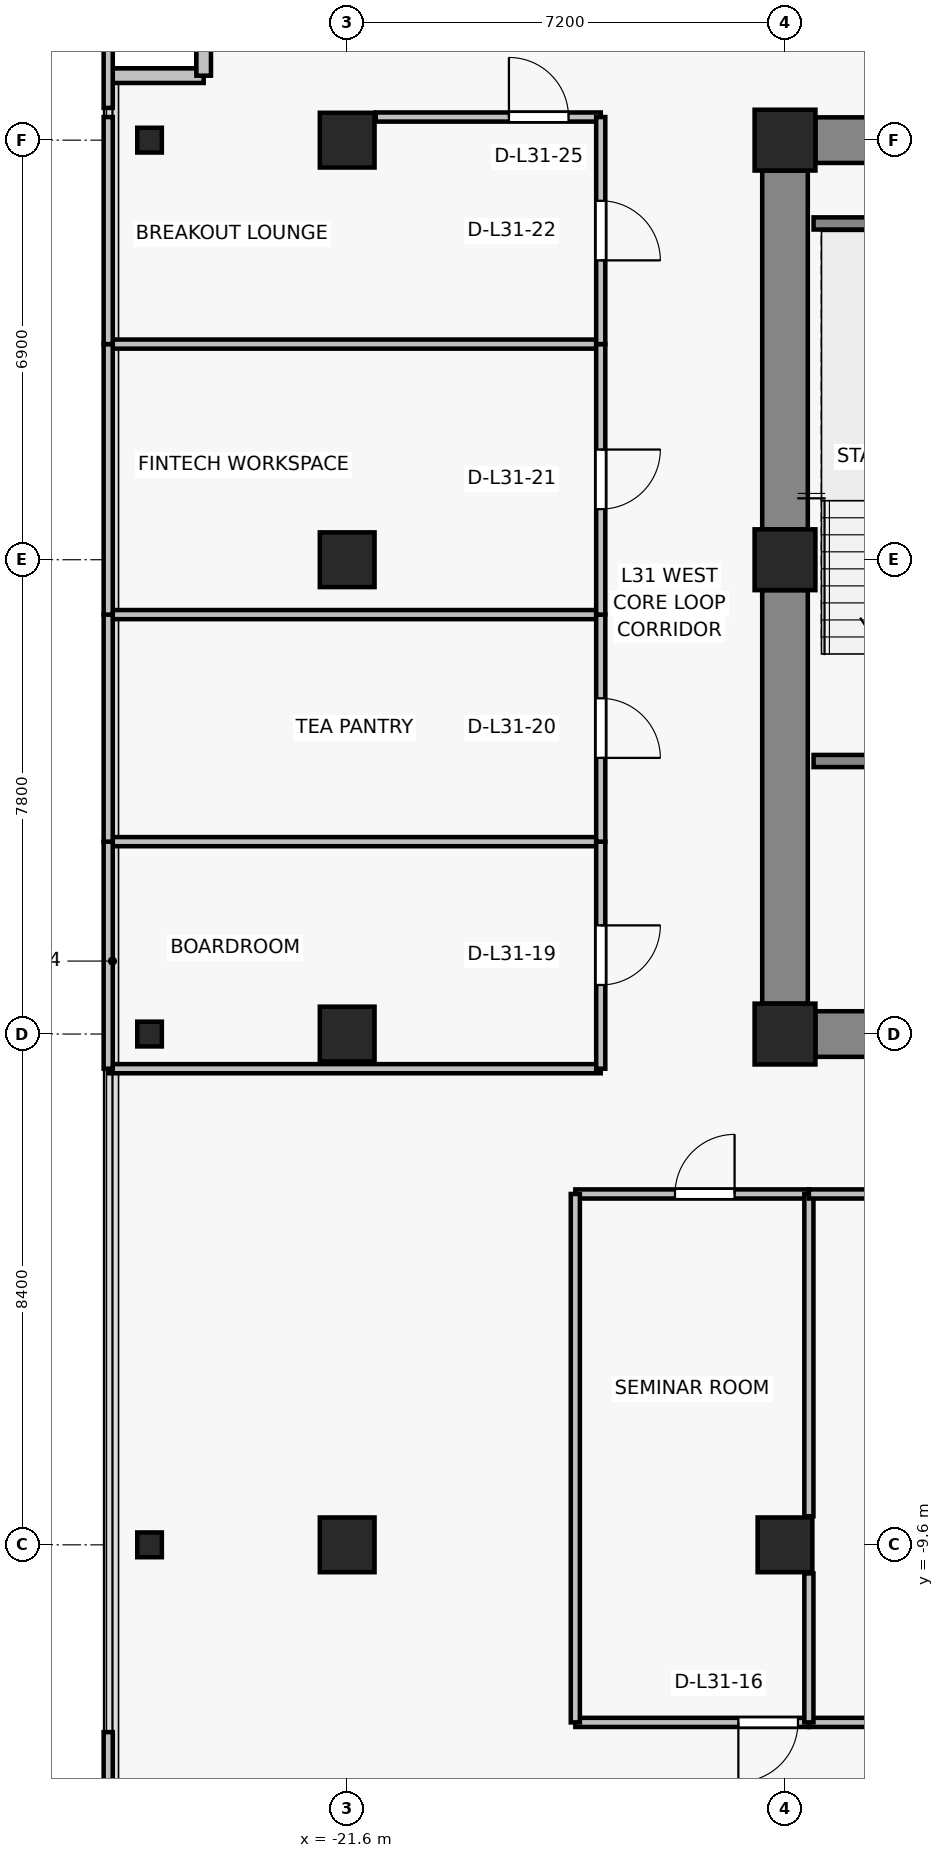
"""IFC4 building model, lengths in metres.
Left out: names, types, materials, properties, quantities, classifications, styles, units other than length and angle.
Written with IfcOpenShell. Run it as: python <this file> out.ifc"""

import sys

from ifc_helpers import new_model, si_unit, direction, frame, frame_2d, origin, origin_2d, place, context, subcontext, project, spatial, rectangle, i_section, extrude, source, transform, mapped, element, fill, save


model = new_model("IFC4")
c1 = context("Model", 3, precision=1e-05, world=origin(), true_north=direction((0.0, 1.0)))
c2 = subcontext(c1, "Body", "Model", "MODEL_VIEW")
j1 = project(units=[si_unit("LENGTHUNIT", "METRE"), si_unit("PLANEANGLEUNIT", "RADIAN")], contexts=[c1])
p1 = place(None, origin())
s1 = spatial("IfcSite", under=j1, at=p1, CompositionType="ELEMENT")
p2 = place(p1, origin())
s2 = spatial("IfcBuilding", under=s1, at=p2, CompositionType="ELEMENT")
p3 = place(p2, frame((0.0, 0.0, 113.2)))
s3 = spatial("IfcBuildingStorey", under=s2, at=p3, CompositionType="ELEMENT", Elevation=113.2)
for number, where, z_axis, x_axis in (
    (1, (-14.4, -1.2, 0.0), (0.0, 0.0, 1.0), (1.0, 0.0, 0.0)),
    (2, (-14.4, 6.6, 0.0), (0.0, 0.0, 1.0), (1.0, 0.0, 0.0)),
    (3, (-14.4, 13.5, 0.0), (0.0, 0.0, 1.0), (1.0, 0.0, 0.0)),
):
    element("IfcColumn", number, at=place(p3, frame(where, z_axis=z_axis, x_axis=x_axis)), inside=s3, PredefinedType="COLUMN", context=c2, shape_type="SweptSolid", body=[
        extrude(rectangle(XDim=1.0, YDim=1.0, at=origin_2d()), origin(), (0.0, 0.0, 1.0), 3.3),
    ])
for number, where, z_axis, x_axis in (
    (4, (-14.4, -9.6, 0.0), (0.0, 0.0, 1.0), (1.0, 0.0, 0.0)),
    (5, (-21.6, -9.6, 0.0), (0.0, 0.0, 1.0), (1.0, 0.0, 0.0)),
    (6, (-21.6, -1.2, 0.0), (0.0, 0.0, 1.0), (1.0, 0.0, 0.0)),
    (7, (-21.6, 6.6, 0.0), (0.0, 0.0, 1.0), (1.0, 0.0, 0.0)),
    (8, (-21.6, 13.5, 0.0), (0.0, 0.0, 1.0), (1.0, 0.0, 0.0)),
):
    element("IfcColumn", number, at=place(p3, frame(where, z_axis=z_axis, x_axis=x_axis)), inside=s3, PredefinedType="COLUMN", context=c2, shape_type="SweptSolid", body=[
        extrude(rectangle(XDim=0.9, YDim=0.9, at=origin_2d()), origin(), (0.0, 0.0, 1.0), 3.3),
    ])
for number, where, z_axis, x_axis in (
    (9, (-24.85, -9.6, 0.0), (0.0, 0.0, 1.0), (1.0, 0.0, 0.0)),
    (10, (-24.85, -1.2, 0.0), (0.0, 0.0, 1.0), (1.0, 0.0, 0.0)),
    (11, (-24.85, 13.5, 0.0), (0.0, 0.0, 1.0), (1.0, 0.0, 0.0)),
):
    element("IfcColumn", number, at=place(p3, frame(where, z_axis=z_axis, x_axis=x_axis)), inside=s3, PredefinedType="COLUMN", context=c2, shape_type="SweptSolid", body=[
        extrude(i_section(OverallWidth=0.404, OverallDepth=0.407, WebThickness=0.022, FlangeThickness=0.032, FilletRadius=0.015, at=origin_2d()), origin(), (0.0, 0.0, 1.0), 3.3),
    ])
p4 = place(p3, frame((-13.9, 13.5, 0.0), z_axis=(0.0, 0.0, 1.0), x_axis=(1.0, 0.0, 0.0)))
e12 = element("IfcWall", 12, at=p4, inside=s3, PredefinedType="SHEAR", context=c2, shape_type="SweptSolid", body=[
    extrude(rectangle(XDim=6.2, YDim=0.75, at=frame_2d((3.1, 0.0))), origin(), (0.0, 0.0, 1.0), 3.075),
])
p5 = place(p3, frame((-14.4, -0.7, 0.0), z_axis=(0.0, 0.0, 1.0), x_axis=(0.0, 1.0, 0.0)))
e13 = element("IfcWall", 13, at=p5, inside=s3, PredefinedType="SHEAR", context=c2, shape_type="SweptSolid", body=[
    extrude(rectangle(XDim=6.8, YDim=0.75, at=frame_2d((3.4, 0.0))), origin(), (0.0, 0.0, 1.0), 3.075),
])
p6 = place(p3, frame((-14.4, 7.1, 0.0), z_axis=(0.0, 0.0, 1.0), x_axis=(0.0, 1.0, 0.0)))
e14 = element("IfcWall", 14, at=p6, inside=s3, PredefinedType="SHEAR", context=c2, shape_type="SweptSolid", body=[
    extrude(rectangle(XDim=5.9, YDim=0.75, at=frame_2d((2.95, 0.0))), origin(), (0.0, 0.0, 1.0), 3.075),
])
p7 = place(p3, frame((-7.7, -1.2, 0.0), z_axis=(0.0, 0.0, 1.0), x_axis=(-1.0, 0.0, 0.0)))
e15 = element("IfcWall", 15, at=p7, inside=s3, PredefinedType="SHEAR", context=c2, shape_type="SweptSolid", body=[
    extrude(rectangle(XDim=6.2, YDim=0.75, at=frame_2d((3.1, 0.0))), origin(), (0.0, 0.0, 1.0), 3.075),
])
p8 = place(p7, frame((2.625, 0.0, 0.0)))
e16 = element("IfcOpeningElement", 16, at=p8, cuts=e15, PredefinedType="OPENING", context=c2, shape_type="SweptSolid", body=[
    extrude(rectangle(XDim=1.15, YDim=2.15, at=frame_2d((0.575, 1.075))), frame((0.0, 0.385, 0.0), z_axis=(0.0, -1.0, 0.0), x_axis=(1.0, 0.0, 0.0)), (0.0, 0.0, 1.0), 0.77),
])
for number, where, z_axis, x_axis in (
    (17, (-23.96, 14.56, 0.0), (0.0, 0.0, 1.0), (-1.0, 0.0, 0.0)),
    (18, (-23.96, 16.06, 0.0), (0.0, 0.0, 1.0), (0.0, -1.0, 0.0)),
):
    element("IfcWall", number, at=place(p3, frame(where, z_axis=z_axis, x_axis=x_axis)), inside=s3, PredefinedType="SOLIDWALL", context=c2, shape_type="SweptSolid", body=[
        extrude(rectangle(XDim=1.5, YDim=0.24, at=frame_2d((0.75, 0.0))), origin(), (0.0, 0.0, 1.0), 3.075),
    ])
p9 = place(p3, frame((-10.41, 3.29, 0.0), z_axis=(0.0, 0.0, 1.0), x_axis=(-1.0, 0.0, 0.0)))
e19 = element("IfcWall", 19, at=p9, inside=s3, PredefinedType="SOLIDWALL", context=c2, shape_type="SweptSolid", body=[
    extrude(rectangle(XDim=3.52, YDim=0.2, at=frame_2d((1.76, 0.0))), origin(), (0.0, 0.0, 1.0), 3.075),
])
p10 = place(p9, frame((1.165, 0.0, 0.0)))
e20 = element("IfcOpeningElement", 20, at=p10, cuts=e19, PredefinedType="OPENING", context=c2, shape_type="SweptSolid", body=[
    extrude(rectangle(XDim=1.15, YDim=2.15, at=frame_2d((0.575, 1.075))), frame((0.0, 0.11, 0.0), z_axis=(0.0, -1.0, 0.0), x_axis=(1.0, 0.0, 0.0)), (0.0, 0.0, 1.0), 0.22),
])
p11 = place(p3, frame((-13.93, 12.13, 0.0), z_axis=(0.0, 0.0, 1.0), x_axis=(1.0, 0.0, 0.0)))
e21 = element("IfcWall", 21, at=p11, inside=s3, PredefinedType="SOLIDWALL", context=c2, shape_type="SweptSolid", body=[
    extrude(rectangle(XDim=3.52, YDim=0.2, at=frame_2d((1.76, 0.0))), origin(), (0.0, 0.0, 1.0), 3.075),
])
p12 = place(p3, frame((-14.007, -12.52, 0.0), z_axis=(0.0, 0.0, 1.0), x_axis=(-1.0, 0.0, 0.0)))
e22 = element("IfcWall", 22, at=p12, inside=s3, PredefinedType="PARTITIONING", context=c2, shape_type="SweptSolid", body=[
    extrude(rectangle(XDim=3.841, YDim=0.15, at=frame_2d((1.92, 0.0))), origin(), (0.0, 0.0, 1.0), 2.515),
])
p13 = place(p12, frame((0.18, 0.0, 0.0)))
e23 = element("IfcOpeningElement", 23, at=p13, cuts=e22, PredefinedType="OPENING", context=c2, shape_type="SweptSolid", body=[
    extrude(rectangle(XDim=0.98, YDim=2.15, at=frame_2d((0.49, 1.075))), frame((0.0, 0.085, 0.0), z_axis=(0.0, -1.0, 0.0), x_axis=(1.0, 0.0, 0.0)), (0.0, 0.0, 1.0), 0.17),
])
p14 = place(p3, frame((-17.848, -3.83, 0.0), z_axis=(0.0, 0.0, 1.0), x_axis=(1.0, 0.0, 0.0)))
e24 = element("IfcWall", 24, at=p14, inside=s3, PredefinedType="PARTITIONING", context=c2, shape_type="SweptSolid", body=[
    extrude(rectangle(XDim=3.841, YDim=0.15, at=frame_2d((1.92, 0.0))), origin(), (0.0, 0.0, 1.0), 2.515),
])
p15 = place(p14, frame((1.639, 0.0, 0.0)))
e25 = element("IfcOpeningElement", 25, at=p15, cuts=e24, PredefinedType="OPENING", context=c2, shape_type="SweptSolid", body=[
    extrude(rectangle(XDim=0.98, YDim=2.15, at=frame_2d((0.49, 1.075))), frame((0.0, 0.085, 0.0), z_axis=(0.0, -1.0, 0.0), x_axis=(1.0, 0.0, 0.0)), (0.0, 0.0, 1.0), 0.17),
])
p16 = place(p3, frame((-17.848, -12.52, 0.0), z_axis=(0.0, 0.0, 1.0), x_axis=(0.0, 1.0, 0.0)))
e26 = element("IfcWall", 26, at=p16, inside=s3, PredefinedType="PARTITIONING", context=c2, shape_type="SweptSolid", body=[
    extrude(rectangle(XDim=8.69, YDim=0.15, at=frame_2d((4.345, 0.0))), origin(), (0.0, 0.0, 1.0), 2.515),
])
p17 = place(p3, frame((-14.007, -3.83, 0.0), z_axis=(0.0, 0.0, 1.0), x_axis=(0.0, -1.0, 0.0)))
e27 = element("IfcWall", 27, at=p17, inside=s3, PredefinedType="PARTITIONING", context=c2, shape_type="SweptSolid", body=[
    extrude(rectangle(XDim=5.3, YDim=0.15, at=frame_2d((2.65, 0.0))), origin(), (0.0, 0.0, 1.0), 2.615),
])
p18 = place(p3, frame((-9.43, -12.52, 0.0), z_axis=(0.0, 0.0, 1.0), x_axis=(-1.0, 0.0, 0.0)))
e28 = element("IfcWall", 28, at=p18, inside=s3, PredefinedType="PARTITIONING", context=c2, shape_type="SweptSolid", body=[
    extrude(rectangle(XDim=4.577, YDim=0.15, at=frame_2d((2.289, 0.0))), origin(), (0.0, 0.0, 1.0), 2.665),
])
p19 = place(p3, frame((-14.007, -3.83, 0.0), z_axis=(0.0, 0.0, 1.0), x_axis=(1.0, 0.0, 0.0)))
e29 = element("IfcWall", 29, at=p19, inside=s3, PredefinedType="PARTITIONING", context=c2, shape_type="SweptSolid", body=[
    extrude(rectangle(XDim=4.577, YDim=0.15, at=frame_2d((2.289, 0.0))), origin(), (0.0, 0.0, 1.0), 3.075),
])
p20 = place(p19, frame((1.799, 0.0, 0.0)))
e30 = element("IfcOpeningElement", 30, at=p20, cuts=e29, PredefinedType="OPENING", context=c2, shape_type="SweptSolid", body=[
    extrude(rectangle(XDim=0.98, YDim=2.15, at=frame_2d((0.49, 1.075))), frame((0.0, 0.085, 0.0), z_axis=(0.0, -1.0, 0.0), x_axis=(1.0, 0.0, 0.0)), (0.0, 0.0, 1.0), 0.17),
])
p21 = place(p3, frame((-14.007, -12.52, 0.0), z_axis=(0.0, 0.0, 1.0), x_axis=(0.0, 1.0, 0.0)))
e31 = element("IfcWall", 31, at=p21, inside=s3, PredefinedType="PARTITIONING", context=c2, shape_type="SweptSolid", body=[
    extrude(rectangle(XDim=2.45, YDim=0.15, at=frame_2d((1.225, 0.0))), origin(), (0.0, 0.0, 1.0), 3.075),
])
p22 = place(p3, frame((-25.53, -17.63, 0.0), z_axis=(0.0, 0.0, 1.0), x_axis=(0.0, 1.0, 0.0)))
e32 = element("IfcWall", 32, at=p22, inside=s3, PredefinedType="PARTITIONING", context=c2, shape_type="SweptSolid", body=[
    extrude(rectangle(XDim=4.95, YDim=0.15, at=frame_2d((2.475, 0.0))), origin(), (0.0, 0.0, 1.0), 3.075),
])
for number, where, z_axis, x_axis in (
    (33, (-17.43, -1.77, 0.0), (0.0, 0.0, 1.0), (-1.0, 0.0, 0.0)),
    (34, (-25.53, 1.964, 0.0), (0.0, 0.0, 1.0), (1.0, 0.0, 0.0)),
):
    element("IfcWall", number, at=place(p3, frame(where, z_axis=z_axis, x_axis=x_axis)), inside=s3, PredefinedType="PARTITIONING", context=c2, shape_type="SweptSolid", body=[
        extrude(rectangle(XDim=8.1, YDim=0.15, at=frame_2d((4.05, 0.0))), origin(), (0.0, 0.0, 1.0), 2.515),
    ])
p23 = place(p3, frame((-25.53, -1.77, 0.0), z_axis=(0.0, 0.0, 1.0), x_axis=(0.0, 1.0, 0.0)))
e35 = element("IfcWall", 35, at=p23, inside=s3, PredefinedType="PARTITIONING", context=c2, shape_type="SweptSolid", body=[
    extrude(rectangle(XDim=3.734, YDim=0.15, at=frame_2d((1.867, 0.0))), origin(), (0.0, 0.0, 1.0), 3.075),
])
p24 = place(p3, frame((-17.43, 1.964, 0.0), z_axis=(0.0, 0.0, 1.0), x_axis=(0.0, -1.0, 0.0)))
e36 = element("IfcWall", 36, at=p24, inside=s3, PredefinedType="PARTITIONING", context=c2, shape_type="SweptSolid", body=[
    extrude(rectangle(XDim=3.734, YDim=0.15, at=frame_2d((1.867, 0.0))), origin(), (0.0, 0.0, 1.0), 2.515),
])
p25 = place(p24, frame((1.377, 0.0, 0.0)))
e37 = element("IfcOpeningElement", 37, at=p25, cuts=e36, PredefinedType="OPENING", context=c2, shape_type="SweptSolid", body=[
    extrude(rectangle(XDim=0.98, YDim=2.15, at=frame_2d((0.49, 1.075))), frame((0.0, 0.085, 0.0), z_axis=(0.0, -1.0, 0.0), x_axis=(1.0, 0.0, 0.0)), (0.0, 0.0, 1.0), 0.17),
])
p26 = place(p3, frame((-25.53, 5.698, 0.0), z_axis=(0.0, 0.0, 1.0), x_axis=(1.0, 0.0, 0.0)))
e38 = element("IfcWall", 38, at=p26, inside=s3, PredefinedType="PARTITIONING", context=c2, shape_type="SweptSolid", body=[
    extrude(rectangle(XDim=8.1, YDim=0.15, at=frame_2d((4.05, 0.0))), origin(), (0.0, 0.0, 1.0), 2.515),
])
p27 = place(p3, frame((-25.53, 1.964, 0.0), z_axis=(0.0, 0.0, 1.0), x_axis=(0.0, 1.0, 0.0)))
e39 = element("IfcWall", 39, at=p27, inside=s3, PredefinedType="PARTITIONING", context=c2, shape_type="SweptSolid", body=[
    extrude(rectangle(XDim=3.734, YDim=0.15, at=frame_2d((1.867, 0.0))), origin(), (0.0, 0.0, 1.0), 3.075),
])
p28 = place(p3, frame((-17.43, 5.698, 0.0), z_axis=(0.0, 0.0, 1.0), x_axis=(0.0, -1.0, 0.0)))
e40 = element("IfcWall", 40, at=p28, inside=s3, PredefinedType="PARTITIONING", context=c2, shape_type="SweptSolid", body=[
    extrude(rectangle(XDim=3.734, YDim=0.15, at=frame_2d((1.867, 0.0))), origin(), (0.0, 0.0, 1.0), 3.075),
])
p29 = place(p28, frame((1.377, 0.0, 0.0)))
e41 = element("IfcOpeningElement", 41, at=p29, cuts=e40, PredefinedType="OPENING", context=c2, shape_type="SweptSolid", body=[
    extrude(rectangle(XDim=0.98, YDim=2.15, at=frame_2d((0.49, 1.075))), frame((0.0, 0.085, 0.0), z_axis=(0.0, -1.0, 0.0), x_axis=(1.0, 0.0, 0.0)), (0.0, 0.0, 1.0), 0.17),
])
p30 = place(p3, frame((-25.53, 10.146, 0.0), z_axis=(0.0, 0.0, 1.0), x_axis=(1.0, 0.0, 0.0)))
e42 = element("IfcWall", 42, at=p30, inside=s3, PredefinedType="PARTITIONING", context=c2, shape_type="SweptSolid", body=[
    extrude(rectangle(XDim=8.1, YDim=0.15, at=frame_2d((4.05, 0.0))), origin(), (0.0, 0.0, 1.0), 2.515),
])
p31 = place(p3, frame((-25.53, 5.698, 0.0), z_axis=(0.0, 0.0, 1.0), x_axis=(0.0, 1.0, 0.0)))
e43 = element("IfcWall", 43, at=p31, inside=s3, PredefinedType="PARTITIONING", context=c2, shape_type="SweptSolid", body=[
    extrude(rectangle(XDim=4.449, YDim=0.15, at=frame_2d((2.224, 0.0))), origin(), (0.0, 0.0, 1.0), 3.075),
])
p32 = place(p3, frame((-17.43, 10.146, 0.0), z_axis=(0.0, 0.0, 1.0), x_axis=(0.0, -1.0, 0.0)))
e44 = element("IfcWall", 44, at=p32, inside=s3, PredefinedType="PARTITIONING", context=c2, shape_type="SweptSolid", body=[
    extrude(rectangle(XDim=4.449, YDim=0.15, at=frame_2d((2.224, 0.0))), origin(), (0.0, 0.0, 1.0), 2.515),
])
p33 = place(p32, frame((1.734, 0.0, 0.0)))
e45 = element("IfcOpeningElement", 45, at=p33, cuts=e44, PredefinedType="OPENING", context=c2, shape_type="SweptSolid", body=[
    extrude(rectangle(XDim=0.98, YDim=2.15, at=frame_2d((0.49, 1.075))), frame((0.0, 0.085, 0.0), z_axis=(0.0, -1.0, 0.0), x_axis=(1.0, 0.0, 0.0)), (0.0, 0.0, 1.0), 0.17),
])
p34 = place(p3, frame((-21.13, 13.88, 0.0), z_axis=(0.0, 0.0, 1.0), x_axis=(1.0, 0.0, 0.0)))
e46 = element("IfcWall", 46, at=p34, inside=s3, PredefinedType="PARTITIONING", context=c2, shape_type="SweptSolid", body=[
    extrude(rectangle(XDim=3.7, YDim=0.15, at=frame_2d((1.85, 0.0))), origin(), (0.0, 0.0, 1.0), 3.075),
])
p35 = place(p34, frame((2.19, 0.0, 0.0)))
e47 = element("IfcOpeningElement", 47, at=p35, cuts=e46, PredefinedType="OPENING", context=c2, shape_type="SweptSolid", body=[
    extrude(rectangle(XDim=0.98, YDim=2.15, at=frame_2d((0.49, 1.075))), frame((0.0, 0.085, 0.0), z_axis=(0.0, -1.0, 0.0), x_axis=(1.0, 0.0, 0.0)), (0.0, 0.0, 1.0), 0.17),
])
p36 = place(p3, frame((-25.53, 10.146, 0.0), z_axis=(0.0, 0.0, 1.0), x_axis=(0.0, 1.0, 0.0)))
e48 = element("IfcWall", 48, at=p36, inside=s3, PredefinedType="PARTITIONING", context=c2, shape_type="SweptSolid", body=[
    extrude(rectangle(XDim=3.734, YDim=0.15, at=frame_2d((1.867, 0.0))), origin(), (0.0, 0.0, 1.0), 3.075),
])
p37 = place(p3, frame((-17.43, 13.88, 0.0), z_axis=(0.0, 0.0, 1.0), x_axis=(0.0, -1.0, 0.0)))
e49 = element("IfcWall", 49, at=p37, inside=s3, PredefinedType="PARTITIONING", context=c2, shape_type="SweptSolid", body=[
    extrude(rectangle(XDim=3.734, YDim=0.15, at=frame_2d((1.867, 0.0))), origin(), (0.0, 0.0, 1.0), 2.515),
])
p38 = place(p37, frame((1.377, 0.0, 0.0)))
e50 = element("IfcOpeningElement", 50, at=p38, cuts=e49, PredefinedType="OPENING", context=c2, shape_type="SweptSolid", body=[
    extrude(rectangle(XDim=0.98, YDim=2.15, at=frame_2d((0.49, 1.075))), frame((0.0, 0.085, 0.0), z_axis=(0.0, -1.0, 0.0), x_axis=(1.0, 0.0, 0.0)), (0.0, 0.0, 1.0), 0.17),
])
p39 = place(p3, frame((-25.53, 14.03, 0.0), z_axis=(0.0, 0.0, 1.0), x_axis=(0.0, 1.0, 0.0)))
e51 = element("IfcWall", 51, at=p39, inside=s3, PredefinedType="PARTITIONING", context=c2, shape_type="SweptSolid", body=[
    extrude(rectangle(XDim=3.6, YDim=0.15, at=frame_2d((1.8, 0.0))), origin(), (0.0, 0.0, 1.0), 3.075),
])
m1 = source(origin(), c2, "Body", "SweptSolid", [
    extrude(rectangle(XDim=0.98, YDim=2.15, at=frame_2d((0.49, 1.075))), frame((0.0, 0.025, 0.0), z_axis=(0.0, -1.0, 0.0), x_axis=(1.0, 0.0, 0.0)), (0.0, 0.0, 1.0), 0.05),
])
p40 = place(p15, origin())
e52 = element("IfcDoor", 52, at=p40, inside=s3, OperationType="SINGLE_SWING_RIGHT", PredefinedType="DOOR", context=c2, shape_type="MappedRepresentation", body=[
    mapped(m1, transform((0.0, 0.0, 0.0), x_axis=(1.0, 0.0, 0.0), y_axis=(0.0, 1.0, 0.0), z_axis=(0.0, 0.0, 1.0), scale=1.0)),
])
fill(e25, e52)
p41 = place(p13, origin())
e53 = element("IfcDoor", 53, at=p41, inside=s3, OperationType="SINGLE_SWING_RIGHT", PredefinedType="DOOR", context=c2, shape_type="MappedRepresentation", body=[
    mapped(m1, transform((0.0, 0.0, 0.0), x_axis=(1.0, 0.0, 0.0), y_axis=(0.0, 1.0, 0.0), z_axis=(0.0, 0.0, 1.0), scale=1.0)),
])
fill(e23, e53)
p42 = place(p25, origin())
e54 = element("IfcDoor", 54, at=p42, inside=s3, OperationType="SINGLE_SWING_LEFT", PredefinedType="DOOR", context=c2, shape_type="MappedRepresentation", body=[
    mapped(m1, transform((0.0, 0.0, 0.0), x_axis=(1.0, 0.0, 0.0), y_axis=(0.0, 1.0, 0.0), z_axis=(0.0, 0.0, 1.0), scale=1.0)),
])
fill(e37, e54)
p43 = place(p29, origin())
e55 = element("IfcDoor", 55, at=p43, inside=s3, OperationType="SINGLE_SWING_RIGHT", PredefinedType="DOOR", context=c2, shape_type="MappedRepresentation", body=[
    mapped(m1, transform((0.0, 0.0, 0.0), x_axis=(1.0, 0.0, 0.0), y_axis=(0.0, 1.0, 0.0), z_axis=(0.0, 0.0, 1.0), scale=1.0)),
])
fill(e41, e55)
p44 = place(p33, origin())
e56 = element("IfcDoor", 56, at=p44, inside=s3, OperationType="SINGLE_SWING_LEFT", PredefinedType="DOOR", context=c2, shape_type="MappedRepresentation", body=[
    mapped(m1, transform((0.0, 0.0, 0.0), x_axis=(1.0, 0.0, 0.0), y_axis=(0.0, 1.0, 0.0), z_axis=(0.0, 0.0, 1.0), scale=1.0)),
])
fill(e45, e56)
p45 = place(p38, origin())
e57 = element("IfcDoor", 57, at=p45, inside=s3, OperationType="SINGLE_SWING_RIGHT", PredefinedType="DOOR", context=c2, shape_type="MappedRepresentation", body=[
    mapped(m1, transform((0.0, 0.0, 0.0), x_axis=(1.0, 0.0, 0.0), y_axis=(0.0, 1.0, 0.0), z_axis=(0.0, 0.0, 1.0), scale=1.0)),
])
fill(e50, e57)
p46 = place(p35, origin())
e58 = element("IfcDoor", 58, at=p46, inside=s3, OperationType="SINGLE_SWING_LEFT", PredefinedType="DOOR", context=c2, shape_type="MappedRepresentation", body=[
    mapped(m1, transform((0.0, 0.0, 0.0), x_axis=(1.0, 0.0, 0.0), y_axis=(0.0, 1.0, 0.0), z_axis=(0.0, 0.0, 1.0), scale=1.0)),
])
fill(e47, e58)
save(model, sys.argv[1])
